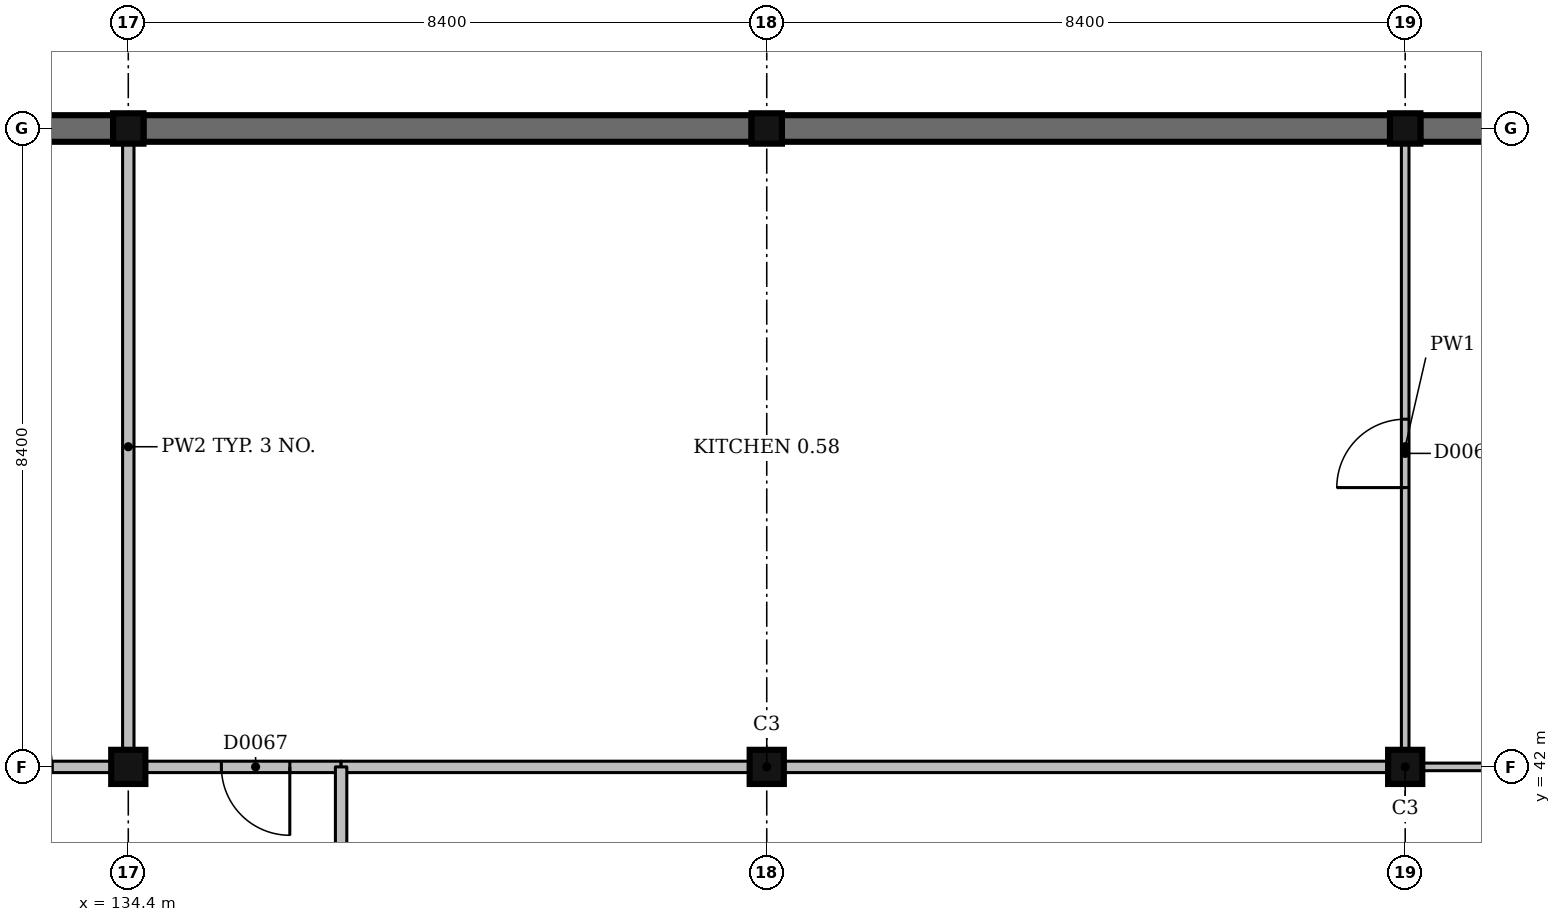
"""IFC4 building model, lengths in metres.
Left out: names, types, materials, properties, quantities, classifications, styles, units other than length and angle.
Written with IfcOpenShell. Run it as: python <this file> out.ifc"""

import sys

from ifc_helpers import new_model, si_unit, direction, frame, frame_2d, origin, origin_2d, place, context, subcontext, project, spatial, rectangle, extrude, element, fill, save


model = new_model("IFC4")
c1 = context("Model", 3, precision=1e-05, world=origin(), true_north=direction((0.0, 1.0)))
c2 = subcontext(c1, "Body", "Model", "MODEL_VIEW")
j1 = project(units=[si_unit("LENGTHUNIT", "METRE"), si_unit("PLANEANGLEUNIT", "RADIAN")], contexts=[c1])
p1 = place(None, origin())
s1 = spatial("IfcSite", under=j1, at=p1, CompositionType="ELEMENT")
p2 = place(p1, origin())
s2 = spatial("IfcBuilding", under=s1, at=p2, CompositionType="ELEMENT")
p3 = place(p2, origin())
s3 = spatial("IfcBuildingStorey", under=s2, at=p3, CompositionType="ELEMENT", Elevation=0.0)
p4 = place(p3, frame((134.4, 42.0, -1.5), z_axis=(0.0, 0.0, 1.0), x_axis=(1.0, 0.0, 0.0)))
e1 = element("IfcColumn", 1, at=p4, inside=s3, PredefinedType="COLUMN", context=c2, shape_type="SweptSolid", body=[
    extrude(rectangle(XDim=0.45, YDim=0.45, at=origin_2d()), origin(), (0.0, 0.0, 1.0), 6.0),
])
p5 = place(p3, frame((134.4, 50.4, -0.25), z_axis=(0.0, 0.0, 1.0), x_axis=(1.0, 0.0, 0.0)))
e2 = element("IfcColumn", 2, at=p5, inside=s3, PredefinedType="COLUMN", context=c2, shape_type="SweptSolid", body=[
    extrude(rectangle(XDim=0.4, YDim=0.4, at=origin_2d()), origin(), (0.0, 0.0, 1.0), 4.75),
])
p6 = place(p3, frame((142.8, 42.0, -1.5), z_axis=(0.0, 0.0, 1.0), x_axis=(1.0, 0.0, 0.0)))
e3 = element("IfcColumn", 3, at=p6, inside=s3, PredefinedType="COLUMN", context=c2, shape_type="SweptSolid", body=[
    extrude(rectangle(XDim=0.45, YDim=0.45, at=origin_2d()), origin(), (0.0, 0.0, 1.0), 6.0),
])
p7 = place(p3, frame((142.8, 50.4, -0.25), z_axis=(0.0, 0.0, 1.0), x_axis=(1.0, 0.0, 0.0)))
e4 = element("IfcColumn", 4, at=p7, inside=s3, PredefinedType="COLUMN", context=c2, shape_type="SweptSolid", body=[
    extrude(rectangle(XDim=0.4, YDim=0.4, at=origin_2d()), origin(), (0.0, 0.0, 1.0), 4.75),
])
p8 = place(p3, frame((151.2, 42.0, -1.5), z_axis=(0.0, 0.0, 1.0), x_axis=(1.0, 0.0, 0.0)))
e5 = element("IfcColumn", 5, at=p8, inside=s3, PredefinedType="COLUMN", context=c2, shape_type="SweptSolid", body=[
    extrude(rectangle(XDim=0.45, YDim=0.45, at=origin_2d()), origin(), (0.0, 0.0, 1.0), 6.0),
])
p9 = place(p3, frame((151.2, 50.4, -0.25), z_axis=(0.0, 0.0, 1.0), x_axis=(1.0, 0.0, 0.0)))
e6 = element("IfcColumn", 6, at=p9, inside=s3, PredefinedType="COLUMN", context=c2, shape_type="SweptSolid", body=[
    extrude(rectangle(XDim=0.4, YDim=0.4, at=origin_2d()), origin(), (0.0, 0.0, 1.0), 4.75),
])
for number, where, z_axis, x_axis in (
    (7, (159.4, 50.4, -0.25), (0.0, 0.0, 1.0), (-1.0, 0.0, 0.0)),
    (8, (151.0, 50.4, -0.25), (0.0, 0.0, 1.0), (-1.0, 0.0, 0.0)),
    (9, (142.6, 50.4, -0.25), (0.0, 0.0, 1.0), (-1.0, 0.0, 0.0)),
    (10, (134.2, 50.4, -0.25), (0.0, 0.0, 1.0), (-1.0, 0.0, 0.0)),
):
    element("IfcWall", number, at=place(p3, frame(where, z_axis=z_axis, x_axis=x_axis)), inside=s3, PredefinedType="SOLIDWALL", context=c2, shape_type="SweptSolid", body=[
        extrude(rectangle(XDim=8.0, YDim=0.35, at=frame_2d((4.0, 0.0))), origin(), (0.0, 0.0, 1.0), 3.75),
    ])
p10 = place(p3, frame((134.625, 42.0, 0.0), z_axis=(0.0, 0.0, 1.0), x_axis=(1.0, 0.0, 0.0)))
e11 = element("IfcWall", 11, at=p10, inside=s3, PredefinedType="PARTITIONING", context=c2, shape_type="SweptSolid", body=[
    extrude(rectangle(XDim=2.575, YDim=0.15, at=frame_2d((1.288, 0.0))), origin(), (0.0, 0.0, 1.0), 3.55),
])
p11 = place(p10, frame((1.0, 0.0, 0.0)))
e12 = element("IfcOpeningElement", 12, at=p11, cuts=e11, PredefinedType="OPENING", context=c2, shape_type="SweptSolid", body=[
    extrude(rectangle(XDim=0.9, YDim=2.1, at=frame_2d((0.45, 1.05))), frame((0.0, 0.085, 0.0), z_axis=(0.0, -1.0, 0.0), x_axis=(1.0, 0.0, 0.0)), (0.0, 0.0, 1.0), 0.17),
])
p12 = place(p3, frame((131.75, 42.0, 0.0), z_axis=(0.0, 0.0, 1.0), x_axis=(1.0, 0.0, 0.0)))
e13 = element("IfcWall", 13, at=p12, inside=s3, PredefinedType="PARTITIONING", context=c2, shape_type="SweptSolid", body=[
    extrude(rectangle(XDim=2.425, YDim=0.15, at=frame_2d((1.212, 0.0))), origin(), (0.0, 0.0, 1.0), 3.65),
])
p13 = place(p12, frame((0.65, 0.0, 0.0)))
e14 = element("IfcOpeningElement", 14, at=p13, cuts=e13, PredefinedType="OPENING", context=c2, shape_type="SweptSolid", body=[
    extrude(rectangle(XDim=1.0, YDim=2.1, at=frame_2d((0.5, 1.05))), frame((0.0, 0.085, 0.0), z_axis=(0.0, -1.0, 0.0), x_axis=(1.0, 0.0, 0.0)), (0.0, 0.0, 1.0), 0.17),
])
p14 = place(p3, frame((151.425, 42.0, 0.0), z_axis=(0.0, 0.0, 1.0), x_axis=(1.0, 0.0, 0.0)))
e15 = element("IfcWall", 15, at=p14, inside=s3, PredefinedType="PARTITIONING", context=c2, shape_type="SweptSolid", body=[
    extrude(rectangle(XDim=2.425, YDim=0.1, at=frame_2d((1.212, 0.0))), origin(), (0.0, 0.0, 1.0), 3.65),
])
p15 = place(p3, frame((137.2, 42.0, 0.0), z_axis=(0.0, 0.0, 1.0), x_axis=(1.0, 0.0, 0.0)))
e16 = element("IfcWall", 16, at=p15, inside=s3, PredefinedType="PARTITIONING", context=c2, shape_type="SweptSolid", body=[
    extrude(rectangle(XDim=5.375, YDim=0.15, at=frame_2d((2.688, 0.0))), origin(), (0.0, 0.0, 1.0), 3.55),
])
p16 = place(p3, frame((143.025, 42.0, 0.0), z_axis=(0.0, 0.0, 1.0), x_axis=(1.0, 0.0, 0.0)))
e17 = element("IfcWall", 17, at=p16, inside=s3, PredefinedType="PARTITIONING", context=c2, shape_type="SweptSolid", body=[
    extrude(rectangle(XDim=7.95, YDim=0.15, at=frame_2d((3.975, 0.0))), origin(), (0.0, 0.0, 1.0), 3.55),
])
p17 = place(p3, frame((134.4, 42.225, 0.0), z_axis=(0.0, 0.0, 1.0), x_axis=(0.0, 1.0, 0.0)))
e18 = element("IfcWall", 18, at=p17, inside=s3, PredefinedType="PARTITIONING", context=c2, shape_type="SweptSolid", body=[
    extrude(rectangle(XDim=7.975, YDim=0.15, at=frame_2d((3.987, 0.0))), origin(), (0.0, 0.0, 1.0), 3.55),
])
p18 = place(p3, frame((137.2, 37.8, 0.0), z_axis=(0.0, 0.0, 1.0), x_axis=(0.0, 1.0, 0.0)))
e19 = element("IfcWall", 19, at=p18, inside=s3, PredefinedType="PARTITIONING", context=c2, shape_type="SweptSolid", body=[
    extrude(rectangle(XDim=4.2, YDim=0.15, at=frame_2d((2.1, 0.0))), origin(), (0.0, 0.0, 1.0), 3.55),
])
p19 = place(p18, frame((1.7, 0.0, 0.0)))
e20 = element("IfcOpeningElement", 20, at=p19, cuts=e19, PredefinedType="OPENING", context=c2, shape_type="SweptSolid", body=[
    extrude(rectangle(XDim=0.9, YDim=2.1, at=frame_2d((0.45, 1.05))), frame((0.0, 0.085, 0.0), z_axis=(0.0, -1.0, 0.0), x_axis=(1.0, 0.0, 0.0)), (0.0, 0.0, 1.0), 0.17),
])
p20 = place(p3, frame((151.2, 42.225, 0.0), z_axis=(0.0, 0.0, 1.0), x_axis=(0.0, 1.0, 0.0)))
e21 = element("IfcWall", 21, at=p20, inside=s3, PredefinedType="PARTITIONING", context=c2, shape_type="SweptSolid", body=[
    extrude(rectangle(XDim=7.975, YDim=0.1, at=frame_2d((3.987, 0.0))), origin(), (0.0, 0.0, 1.0), 3.55),
])
p21 = place(p20, frame((3.45, 0.0, 0.0)))
e22 = element("IfcOpeningElement", 22, at=p21, cuts=e21, PredefinedType="OPENING", context=c2, shape_type="SweptSolid", body=[
    extrude(rectangle(XDim=0.9, YDim=2.1, at=frame_2d((0.45, 1.05))), frame((0.0, 0.06, 0.0), z_axis=(0.0, -1.0, 0.0), x_axis=(1.0, 0.0, 0.0)), (0.0, 0.0, 1.0), 0.12),
])
p22 = place(p11, origin())
e23 = element("IfcDoor", 23, at=p22, inside=s3, OperationType="SINGLE_SWING_RIGHT", PredefinedType="DOOR", context=c2, shape_type="SweptSolid", body=[
    extrude(rectangle(XDim=0.9, YDim=2.1, at=frame_2d((0.45, 1.05))), frame((0.0, 0.025, 0.0), z_axis=(0.0, -1.0, 0.0), x_axis=(1.0, 0.0, 0.0)), (0.0, 0.0, 1.0), 0.05),
])
fill(e12, e23)
p23 = place(p21, origin())
e24 = element("IfcDoor", 24, at=p23, inside=s3, OperationType="SINGLE_SWING_LEFT", PredefinedType="DOOR", context=c2, shape_type="SweptSolid", body=[
    extrude(rectangle(XDim=0.9, YDim=2.1, at=frame_2d((0.45, 1.05))), frame((0.0, 0.025, 0.0), z_axis=(0.0, -1.0, 0.0), x_axis=(1.0, 0.0, 0.0)), (0.0, 0.0, 1.0), 0.05),
])
fill(e22, e24)
save(model, sys.argv[1])
